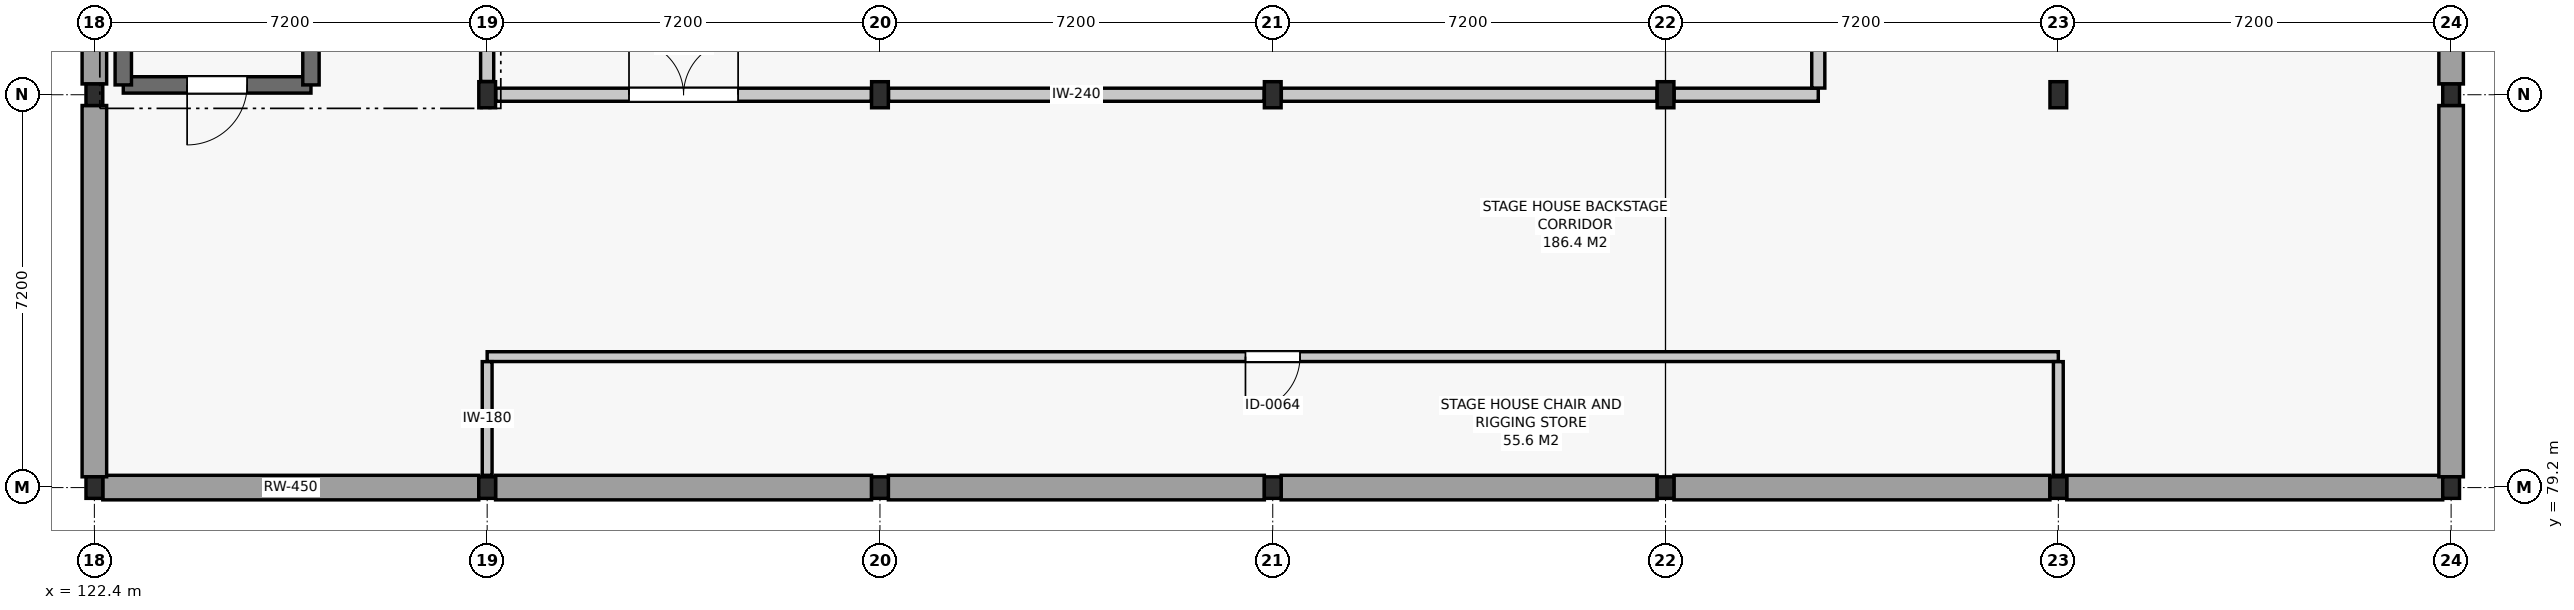
"""IFC4 building model, lengths in metres.
Left out: names, types, materials, properties, quantities, classifications, styles, units other than length and angle.
Written with IfcOpenShell. Run it as: python <this file> out.ifc"""

import sys

from ifc_helpers import new_model, si_unit, direction, frame, frame_2d, origin, origin_2d, place, context, subcontext, project, spatial, rectangle, i_section, extrude, element, fill, save


model = new_model("IFC4")
c1 = context("Model", 3, precision=1e-05, world=origin(), true_north=direction((0.0, 1.0)))
c2 = subcontext(c1, "Body", "Model", "MODEL_VIEW")
j1 = project(units=[si_unit("LENGTHUNIT", "METRE"), si_unit("PLANEANGLEUNIT", "RADIAN")], contexts=[c1])
p1 = place(None, origin())
s1 = spatial("IfcSite", under=j1, at=p1, CompositionType="ELEMENT")
p2 = place(p1, origin())
s2 = spatial("IfcBuilding", under=s1, at=p2, CompositionType="ELEMENT")
p3 = place(p2, frame((0.0, 0.0, -4.2)))
s3 = spatial("IfcBuildingStorey", under=s2, at=p3, CompositionType="ELEMENT", Elevation=-4.2)
for number, where, z_axis, x_axis in (
    (1, (122.4, 79.2, 0.0), (0.0, 0.0, 1.0), (1.0, 0.0, 0.0)),
    (2, (122.4, 86.4, 0.0), (0.0, 0.0, 1.0), (1.0, 0.0, 0.0)),
    (3, (129.6, 79.2, 0.0), (0.0, 0.0, 1.0), (1.0, 0.0, 0.0)),
):
    element("IfcColumn", number, at=place(p3, frame(where, z_axis=z_axis, x_axis=x_axis)), inside=s3, PredefinedType="COLUMN", context=c2, shape_type="SweptSolid", body=[
        extrude(i_section(OverallWidth=0.308, OverallDepth=0.395, WebThickness=0.021, FlangeThickness=0.036, FilletRadius=0.027, at=origin_2d()), origin(), (0.0, 0.0, 1.0), 4.2),
    ])
p4 = place(p3, frame((129.6, 86.4, 0.0), z_axis=(0.0, 0.0, 1.0), x_axis=(1.0, 0.0, 0.0)))
e4 = element("IfcColumn", 4, at=p4, inside=s3, PredefinedType="COLUMN", context=c2, shape_type="SweptSolid", body=[
    extrude(i_section(OverallWidth=0.307, OverallDepth=0.478, WebThickness=0.021, FlangeThickness=0.04, FilletRadius=0.027, at=origin_2d()), origin(), (0.0, 0.0, 1.0), 4.2),
])
p5 = place(p3, frame((136.8, 79.2, 0.0), z_axis=(0.0, 0.0, 1.0), x_axis=(1.0, 0.0, 0.0)))
e5 = element("IfcColumn", 5, at=p5, inside=s3, PredefinedType="COLUMN", context=c2, shape_type="SweptSolid", body=[
    extrude(i_section(OverallWidth=0.308, OverallDepth=0.395, WebThickness=0.021, FlangeThickness=0.036, FilletRadius=0.027, at=origin_2d()), origin(), (0.0, 0.0, 1.0), 4.2),
])
p6 = place(p3, frame((136.8, 86.4, 0.0), z_axis=(0.0, 0.0, 1.0), x_axis=(1.0, 0.0, 0.0)))
e6 = element("IfcColumn", 6, at=p6, inside=s3, PredefinedType="COLUMN", context=c2, shape_type="SweptSolid", body=[
    extrude(i_section(OverallWidth=0.307, OverallDepth=0.478, WebThickness=0.021, FlangeThickness=0.04, FilletRadius=0.027, at=origin_2d()), origin(), (0.0, 0.0, 1.0), 4.2),
])
p7 = place(p3, frame((144.0, 79.2, 0.0), z_axis=(0.0, 0.0, 1.0), x_axis=(1.0, 0.0, 0.0)))
e7 = element("IfcColumn", 7, at=p7, inside=s3, PredefinedType="COLUMN", context=c2, shape_type="SweptSolid", body=[
    extrude(i_section(OverallWidth=0.308, OverallDepth=0.395, WebThickness=0.021, FlangeThickness=0.036, FilletRadius=0.027, at=origin_2d()), origin(), (0.0, 0.0, 1.0), 4.2),
])
p8 = place(p3, frame((144.0, 86.4, 0.0), z_axis=(0.0, 0.0, 1.0), x_axis=(1.0, 0.0, 0.0)))
e8 = element("IfcColumn", 8, at=p8, inside=s3, PredefinedType="COLUMN", context=c2, shape_type="SweptSolid", body=[
    extrude(i_section(OverallWidth=0.307, OverallDepth=0.478, WebThickness=0.021, FlangeThickness=0.04, FilletRadius=0.027, at=origin_2d()), origin(), (0.0, 0.0, 1.0), 4.2),
])
p9 = place(p3, frame((151.2, 79.2, 0.0), z_axis=(0.0, 0.0, 1.0), x_axis=(1.0, 0.0, 0.0)))
e9 = element("IfcColumn", 9, at=p9, inside=s3, PredefinedType="COLUMN", context=c2, shape_type="SweptSolid", body=[
    extrude(i_section(OverallWidth=0.308, OverallDepth=0.395, WebThickness=0.021, FlangeThickness=0.036, FilletRadius=0.027, at=origin_2d()), origin(), (0.0, 0.0, 1.0), 4.2),
])
p10 = place(p3, frame((151.2, 86.4, 0.0), z_axis=(0.0, 0.0, 1.0), x_axis=(1.0, 0.0, 0.0)))
e10 = element("IfcColumn", 10, at=p10, inside=s3, PredefinedType="COLUMN", context=c2, shape_type="SweptSolid", body=[
    extrude(i_section(OverallWidth=0.307, OverallDepth=0.478, WebThickness=0.021, FlangeThickness=0.04, FilletRadius=0.027, at=origin_2d()), origin(), (0.0, 0.0, 1.0), 4.2),
])
p11 = place(p3, frame((158.4, 79.2, 0.0), z_axis=(0.0, 0.0, 1.0), x_axis=(1.0, 0.0, 0.0)))
e11 = element("IfcColumn", 11, at=p11, inside=s3, PredefinedType="COLUMN", context=c2, shape_type="SweptSolid", body=[
    extrude(i_section(OverallWidth=0.308, OverallDepth=0.395, WebThickness=0.021, FlangeThickness=0.036, FilletRadius=0.027, at=origin_2d()), origin(), (0.0, 0.0, 1.0), 4.2),
])
p12 = place(p3, frame((158.4, 86.4, 0.0), z_axis=(0.0, 0.0, 1.0), x_axis=(1.0, 0.0, 0.0)))
e12 = element("IfcColumn", 12, at=p12, inside=s3, PredefinedType="COLUMN", context=c2, shape_type="SweptSolid", body=[
    extrude(i_section(OverallWidth=0.307, OverallDepth=0.478, WebThickness=0.021, FlangeThickness=0.04, FilletRadius=0.027, at=origin_2d()), origin(), (0.0, 0.0, 1.0), 4.2),
])
for number, where, z_axis, x_axis in (
    (13, (165.6, 79.2, 0.0), (0.0, 0.0, 1.0), (1.0, 0.0, 0.0)),
    (14, (165.6, 86.4, 0.0), (0.0, 0.0, 1.0), (1.0, 0.0, 0.0)),
):
    element("IfcColumn", number, at=place(p3, frame(where, z_axis=z_axis, x_axis=x_axis)), inside=s3, PredefinedType="COLUMN", context=c2, shape_type="SweptSolid", body=[
        extrude(i_section(OverallWidth=0.308, OverallDepth=0.395, WebThickness=0.021, FlangeThickness=0.036, FilletRadius=0.027, at=origin_2d()), origin(), (0.0, 0.0, 1.0), 4.2),
    ])
for number, where, z_axis, x_axis in (
    (15, (122.554, 79.2, 0.0), (0.0, 0.0, 1.0), (1.0, 0.0, 0.0)),
    (16, (129.754, 79.2, 0.0), (0.0, 0.0, 1.0), (1.0, 0.0, 0.0)),
):
    element("IfcWall", number, at=place(p3, frame(where, z_axis=z_axis, x_axis=x_axis)), inside=s3, PredefinedType="USERDEFINED", context=c2, shape_type="SweptSolid", body=[
        extrude(rectangle(XDim=6.892, YDim=0.45, at=frame_2d((3.446, 0.0))), origin(), (0.0, 0.0, 1.0), 3.26),
    ])
for number, where, z_axis, x_axis in (
    (17, (136.954, 79.2, 0.0), (0.0, 0.0, 1.0), (1.0, 0.0, 0.0)),
    (18, (144.154, 79.2, 0.0), (0.0, 0.0, 1.0), (1.0, 0.0, 0.0)),
):
    element("IfcWall", number, at=place(p3, frame(where, z_axis=z_axis, x_axis=x_axis)), inside=s3, PredefinedType="USERDEFINED", context=c2, shape_type="SweptSolid", body=[
        extrude(rectangle(XDim=6.892, YDim=0.45, at=frame_2d((3.446, 0.0))), origin(), (0.0, 0.0, 1.0), 3.26),
    ])
for number, where, z_axis, x_axis in (
    (19, (151.354, 79.2, 0.0), (0.0, 0.0, 1.0), (1.0, 0.0, 0.0)),
    (20, (158.554, 79.2, 0.0), (0.0, 0.0, 1.0), (1.0, 0.0, 0.0)),
):
    element("IfcWall", number, at=place(p3, frame(where, z_axis=z_axis, x_axis=x_axis)), inside=s3, PredefinedType="USERDEFINED", context=c2, shape_type="SweptSolid", body=[
        extrude(rectangle(XDim=6.892, YDim=0.45, at=frame_2d((3.446, 0.0))), origin(), (0.0, 0.0, 1.0), 3.26),
    ])
for number, where, z_axis, x_axis in (
    (21, (122.4, 79.397, 0.0), (0.0, 0.0, 1.0), (0.0, 1.0, 0.0)),
    (22, (165.6, 79.397, 0.0), (0.0, 0.0, 1.0), (0.0, 1.0, 0.0)),
):
    element("IfcWall", number, at=place(p3, frame(where, z_axis=z_axis, x_axis=x_axis)), inside=s3, PredefinedType="USERDEFINED", context=c2, shape_type="SweptSolid", body=[
        extrude(rectangle(XDim=6.805, YDim=0.45, at=frame_2d((3.402, 0.0))), origin(), (0.0, 0.0, 1.0), 3.26),
    ])
for number, where, z_axis, x_axis in (
    (23, (122.4, 86.597, 0.0), (0.0, 0.0, 1.0), (0.0, 1.0, 0.0)),
    (24, (165.6, 86.597, 0.0), (0.0, 0.0, 1.0), (0.0, 1.0, 0.0)),
):
    element("IfcWall", number, at=place(p3, frame(where, z_axis=z_axis, x_axis=x_axis)), inside=s3, PredefinedType="USERDEFINED", context=c2, shape_type="SweptSolid", body=[
        extrude(rectangle(XDim=6.805, YDim=0.45, at=frame_2d((3.403, 0.0))), origin(), (0.0, 0.0, 1.0), 3.26),
    ])
p13 = place(p3, frame((122.93, 86.58, 0.0), z_axis=(0.0, 0.0, 1.0), x_axis=(1.0, 0.0, 0.0)))
e25 = element("IfcWall", 25, at=p13, inside=s3, PredefinedType="SHEAR", context=c2, shape_type="SweptSolid", body=[
    extrude(rectangle(XDim=3.44, YDim=0.3, at=frame_2d((1.72, 0.0))), origin(), (0.0, 0.0, 1.0), 3.88),
])
p14 = place(p13, frame((1.17, 0.0, 0.0)))
e26 = element("IfcOpeningElement", 26, at=p14, cuts=e25, PredefinedType="OPENING", context=c2, shape_type="SweptSolid", body=[
    extrude(rectangle(XDim=1.1, YDim=2.15, at=frame_2d((0.55, 1.075))), frame((0.0, 0.162, 0.0), z_axis=(0.0, -1.0, 0.0), x_axis=(1.0, 0.0, 0.0)), (0.0, 0.0, 1.0), 0.324),
])
for number, where, z_axis, x_axis in (
    (27, (126.37, 86.58, 0.0), (0.0, 0.0, 1.0), (0.0, 1.0, 0.0)),
    (28, (122.93, 93.52, 0.0), (0.0, 0.0, 1.0), (0.0, -1.0, 0.0)),
):
    element("IfcWall", number, at=place(p3, frame(where, z_axis=z_axis, x_axis=x_axis)), inside=s3, PredefinedType="SHEAR", context=c2, shape_type="SweptSolid", body=[
        extrude(rectangle(XDim=6.94, YDim=0.3, at=frame_2d((3.47, 0.0))), origin(), (0.0, 0.0, 1.0), 3.88),
    ])
p15 = place(p3, frame((129.758, 86.4, 0.0), z_axis=(0.0, 0.0, 1.0), x_axis=(1.0, 0.0, 0.0)))
e29 = element("IfcWall", 29, at=p15, inside=s3, PredefinedType="SOLIDWALL", context=c2, shape_type="SweptSolid", body=[
    extrude(rectangle(XDim=6.885, YDim=0.24, at=frame_2d((3.442, 0.0))), origin(), (0.0, 0.0, 1.0), 3.375),
])
p16 = place(p15, frame((2.442, 0.0, 0.0)))
e30 = element("IfcOpeningElement", 30, at=p16, cuts=e29, PredefinedType="OPENING", context=c2, shape_type="SweptSolid", body=[
    extrude(rectangle(XDim=2.0, YDim=2.4, at=frame_2d((1.0, 1.2))), frame((0.0, 0.132, 0.0), z_axis=(0.0, -1.0, 0.0), x_axis=(1.0, 0.0, 0.0)), (0.0, 0.0, 1.0), 0.264),
])
for number, where, z_axis, x_axis in (
    (31, (136.958, 86.4, 0.0), (0.0, 0.0, 1.0), (1.0, 0.0, 0.0)),
    (32, (144.157, 86.4, 0.0), (0.0, 0.0, 1.0), (1.0, 0.0, 0.0)),
):
    element("IfcWall", number, at=place(p3, frame(where, z_axis=z_axis, x_axis=x_axis)), inside=s3, PredefinedType="SOLIDWALL", context=c2, shape_type="SweptSolid", body=[
        extrude(rectangle(XDim=6.885, YDim=0.24, at=frame_2d((3.442, 0.0))), origin(), (0.0, 0.0, 1.0), 3.375),
    ])
p17 = place(p3, frame((151.357, 86.4, 0.0), z_axis=(0.0, 0.0, 1.0), x_axis=(1.0, 0.0, 0.0)))
e33 = element("IfcWall", 33, at=p17, inside=s3, PredefinedType="SOLIDWALL", context=c2, shape_type="SweptSolid", body=[
    extrude(rectangle(XDim=2.643, YDim=0.24, at=frame_2d((1.321, 0.0))), origin(), (0.0, 0.0, 1.0), 3.375),
])
p18 = place(p3, frame((129.6, 81.6, 0.0), z_axis=(0.0, 0.0, 1.0), x_axis=(1.0, 0.0, 0.0)))
e34 = element("IfcWall", 34, at=p18, inside=s3, PredefinedType="PARTITIONING", context=c2, shape_type="SweptSolid", body=[
    extrude(rectangle(XDim=28.8, YDim=0.18, at=frame_2d((14.4, 0.0))), origin(), (0.0, 0.0, 1.0), 3.315),
])
p19 = place(p18, frame((13.9, 0.0, 0.0)))
e35 = element("IfcOpeningElement", 35, at=p19, cuts=e34, PredefinedType="OPENING", context=c2, shape_type="SweptSolid", body=[
    extrude(rectangle(XDim=1.0, YDim=2.15, at=frame_2d((0.5, 1.075))), frame((0.0, 0.102, 0.0), z_axis=(0.0, -1.0, 0.0), x_axis=(1.0, 0.0, 0.0)), (0.0, 0.0, 1.0), 0.204),
])
p20 = place(p3, frame((129.6, 86.643, 0.0), z_axis=(0.0, 0.0, 1.0), x_axis=(0.0, 1.0, 0.0)))
e36 = element("IfcWall", 36, at=p20, inside=s3, PredefinedType="SOLIDWALL", context=c2, shape_type="SweptSolid", body=[
    extrude(rectangle(XDim=6.714, YDim=0.24, at=frame_2d((3.357, 0.0))), origin(), (0.0, 0.0, 1.0), 3.425),
])
p21 = place(p3, frame((154.0, 86.522, 0.0), z_axis=(0.0, 0.0, 1.0), x_axis=(0.0, 1.0, 0.0)))
e37 = element("IfcWall", 37, at=p21, inside=s3, PredefinedType="SOLIDWALL", context=c2, shape_type="SweptSolid", body=[
    extrude(rectangle(XDim=21.356, YDim=0.24, at=frame_2d((10.678, 0.0))), origin(), (0.0, 0.0, 1.0), 3.375),
])
p22 = place(p21, frame((9.678, 0.0, 0.0)))
e38 = element("IfcOpeningElement", 38, at=p22, cuts=e37, PredefinedType="OPENING", context=c2, shape_type="SweptSolid", body=[
    extrude(rectangle(XDim=2.0, YDim=2.4, at=frame_2d((1.0, 1.2))), frame((0.0, 0.132, 0.0), z_axis=(0.0, -1.0, 0.0), x_axis=(1.0, 0.0, 0.0)), (0.0, 0.0, 1.0), 0.264),
])
for number, where, z_axis, x_axis in (
    (39, (129.6, 79.425, 0.0), (0.0, 0.0, 1.0), (0.0, 1.0, 0.0)),
    (40, (158.4, 79.425, 0.0), (0.0, 0.0, 1.0), (0.0, 1.0, 0.0)),
):
    element("IfcWall", number, at=place(p3, frame(where, z_axis=z_axis, x_axis=x_axis)), inside=s3, PredefinedType="PARTITIONING", context=c2, shape_type="SweptSolid", body=[
        extrude(rectangle(XDim=2.083, YDim=0.18, at=frame_2d((1.042, 0.0))), origin(), (0.0, 0.0, 1.0), 3.425),
    ])
p23 = place(p14, frame((1.1, 0.0, 0.0), z_axis=(0.0, 0.0, 1.0), x_axis=(-1.0, 0.0, 0.0)))
e41 = element("IfcDoor", 41, at=p23, inside=s3, OperationType="SINGLE_SWING_RIGHT", PredefinedType="DOOR", context=c2, shape_type="SweptSolid", body=[
    extrude(rectangle(XDim=1.1, YDim=2.15, at=frame_2d((0.55, 1.075))), frame((0.0, 0.025, 0.0), z_axis=(0.0, -1.0, 0.0), x_axis=(1.0, 0.0, 0.0)), (0.0, 0.0, 1.0), 0.05),
])
fill(e26, e41)
p24 = place(p16, origin())
e42 = element("IfcDoor", 42, at=p24, inside=s3, OperationType="DOUBLE_DOOR_SINGLE_SWING", PredefinedType="DOOR", context=c2, shape_type="SweptSolid", body=[
    extrude(rectangle(XDim=2.0, YDim=2.4, at=frame_2d((1.0, 1.2))), frame((0.0, 0.025, 0.0), z_axis=(0.0, -1.0, 0.0), x_axis=(1.0, 0.0, 0.0)), (0.0, 0.0, 1.0), 0.05),
])
fill(e30, e42)
p25 = place(p19, frame((1.0, 0.0, 0.0), z_axis=(0.0, 0.0, 1.0), x_axis=(-1.0, 0.0, 0.0)))
e43 = element("IfcDoor", 43, at=p25, inside=s3, OperationType="SINGLE_SWING_RIGHT", PredefinedType="DOOR", context=c2, shape_type="SweptSolid", body=[
    extrude(rectangle(XDim=1.0, YDim=2.15, at=frame_2d((0.5, 1.075))), frame((0.0, 0.025, 0.0), z_axis=(0.0, -1.0, 0.0), x_axis=(1.0, 0.0, 0.0)), (0.0, 0.0, 1.0), 0.05),
])
fill(e35, e43)
save(model, sys.argv[1])
